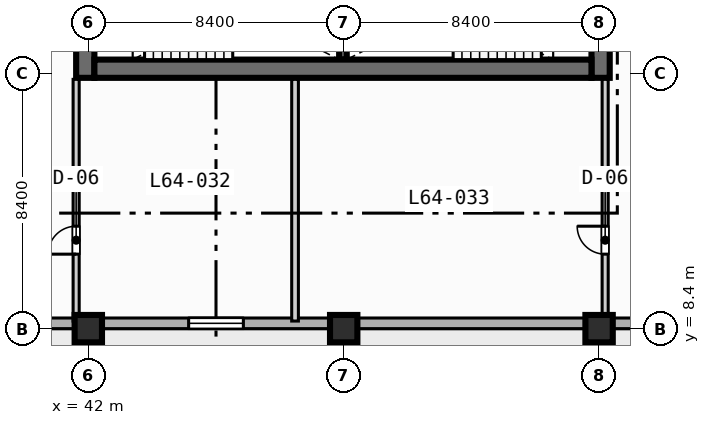
"""IFC4 building model, lengths in metres.
Left out: names, types, materials, properties, quantities, classifications, styles, units other than length and angle.
Written with IfcOpenShell. Run it as: python <this file> out.ifc"""

import sys

from ifc_helpers import new_model, si_unit, direction, frame, frame_2d, origin, origin_2d, place, context, subcontext, project, spatial, rectangle, extrude, element, fill, save


model = new_model("IFC4")
c1 = context("Model", 3, precision=1e-05, world=origin(), true_north=direction((0.0, 1.0)))
c2 = subcontext(c1, "Body", "Model", "MODEL_VIEW")
j1 = project(units=[si_unit("LENGTHUNIT", "METRE"), si_unit("PLANEANGLEUNIT", "RADIAN")], contexts=[c1])
p1 = place(None, origin())
s1 = spatial("IfcSite", under=j1, at=p1, CompositionType="ELEMENT")
p2 = place(p1, origin())
s2 = spatial("IfcBuilding", under=s1, at=p2, CompositionType="ELEMENT")
p3 = place(p2, frame((0.0, 0.0, 260.1)))
s3 = spatial("IfcBuildingStorey", under=s2, at=p3, CompositionType="ELEMENT", Elevation=260.1)
p4 = place(p3, frame((50.375, 17.25, 0.0), z_axis=(0.0, 0.0, 1.0), x_axis=(0.0, 1.0, 0.0)))
e1 = element("IfcWall", 1, at=p4, inside=s3, PredefinedType="SOLIDWALL", context=c2, shape_type="SweptSolid", body=[
    extrude(rectangle(XDim=3.5, YDim=0.25, at=frame_2d((1.75, 0.0))), origin(), (0.0, 0.0, 1.0), 3.47),
])
for number, where, z_axis, x_axis in (
    (2, (41.9, 16.65, 0.0), (0.0, 0.0, 1.0), (0.0, 1.0, 0.0)),
    (3, (58.85, 16.65, 0.0), (0.0, 0.0, 1.0), (0.0, 1.0, 0.0)),
):
    element("IfcWall", number, at=place(p3, frame(where, z_axis=z_axis, x_axis=x_axis)), inside=s3, PredefinedType="SHEAR", context=c2, shape_type="SweptSolid", body=[
        extrude(rectangle(XDim=1.35, YDim=0.6, at=frame_2d((0.675, 0.0))), origin(), (0.0, 0.0, 1.0), 3.47),
    ])
p5 = place(p3, frame((42.2, 16.95, 0.0), z_axis=(0.0, 0.0, 1.0), x_axis=(1.0, 0.0, 0.0)))
e4 = element("IfcWall", 4, at=p5, inside=s3, PredefinedType="SHEAR", context=c2, shape_type="SweptSolid", body=[
    extrude(rectangle(XDim=16.35, YDim=0.6, at=frame_2d((8.175, 0.0))), origin(), (0.0, 0.0, 1.0), 3.47),
])
for number, where, z_axis, x_axis in (
    (5, (42.0, 8.4, 0.0), (0.0, 0.0, 1.0), (1.0, 0.0, 0.0)),
    (6, (50.4, 8.4, 0.0), (0.0, 0.0, 1.0), (1.0, 0.0, 0.0)),
    (7, (58.8, 8.4, 0.0), (0.0, 0.0, 1.0), (1.0, 0.0, 0.0)),
):
    element("IfcColumn", number, at=place(p3, frame(where, z_axis=z_axis, x_axis=x_axis)), inside=s3, PredefinedType="COLUMN", context=c2, shape_type="SweptSolid", body=[
        extrude(rectangle(XDim=0.9, YDim=0.9, at=origin_2d()), origin(), (0.0, 0.0, 1.0), 3.7),
    ])
p6 = place(p3, frame((72.425, 8.575, 0.0), z_axis=(0.0, 0.0, 1.0), x_axis=(-1.0, 0.0, 0.0)))
e8 = element("IfcWall", 8, at=p6, inside=s3, PredefinedType="STANDARD", context=c2, shape_type="SweptSolid", body=[
    extrude(rectangle(XDim=60.85, YDim=0.35, at=frame_2d((30.425, 0.0))), origin(), (0.0, 0.0, 1.0), 3.47),
])
p7 = place(p6, frame((41.325, 0.0, 0.0)))
e9 = element("IfcOpeningElement", 9, at=p7, cuts=e8, PredefinedType="OPENING", context=c2, shape_type="SweptSolid", body=[
    extrude(rectangle(XDim=1.4, YDim=2.2, at=frame_2d((0.7, 1.1))), frame((0.0, 0.185, 0.0), z_axis=(0.0, -1.0, 0.0), x_axis=(1.0, 0.0, 0.0)), (0.0, 0.0, 1.0), 0.37),
])
p8 = place(p6, frame((50.225, 0.0, 0.85)))
e10 = element("IfcOpeningElement", 10, at=p8, cuts=e8, PredefinedType="OPENING", context=c2, shape_type="SweptSolid", body=[
    extrude(rectangle(XDim=2.4, YDim=1.95, at=frame_2d((1.2, 0.975))), frame((0.0, 0.185, 0.0), z_axis=(0.0, -1.0, 0.0), x_axis=(1.0, 0.0, 0.0)), (0.0, 0.0, 1.0), 0.37),
])
p9 = place(p6, frame((33.425, 0.0, 0.85)))
e11 = element("IfcOpeningElement", 11, at=p9, cuts=e8, PredefinedType="OPENING", context=c2, shape_type="SweptSolid", body=[
    extrude(rectangle(XDim=2.4, YDim=1.95, at=frame_2d((1.2, 0.975))), frame((0.0, 0.185, 0.0), z_axis=(0.0, -1.0, 0.0), x_axis=(1.0, 0.0, 0.0)), (0.0, 0.0, 1.0), 0.37),
])
p10 = place(p6, frame((25.325, 0.0, 0.85)))
e12 = element("IfcOpeningElement", 12, at=p10, cuts=e8, PredefinedType="OPENING", context=c2, shape_type="SweptSolid", body=[
    extrude(rectangle(XDim=1.8, YDim=1.8, at=frame_2d((0.9, 0.9))), frame((0.0, 0.185, 0.0), z_axis=(0.0, -1.0, 0.0), x_axis=(1.0, 0.0, 0.0)), (0.0, 0.0, 1.0), 0.37),
])
p11 = place(p6, frame((58.15, 0.0, 0.85)))
e13 = element("IfcOpeningElement", 13, at=p11, cuts=e8, PredefinedType="OPENING", context=c2, shape_type="SweptSolid", body=[
    extrude(rectangle(XDim=1.8, YDim=1.8, at=frame_2d((0.9, 0.9))), frame((0.0, 0.185, 0.0), z_axis=(0.0, -1.0, 0.0), x_axis=(1.0, 0.0, 0.0)), (0.0, 0.0, 1.0), 0.37),
])
p12 = place(p6, frame((56.29, 0.0, 0.85)))
e14 = element("IfcOpeningElement", 14, at=p12, cuts=e8, PredefinedType="OPENING", context=c2, shape_type="SweptSolid", body=[
    extrude(rectangle(XDim=0.72, YDim=1.8, at=frame_2d((0.36, 0.9))), frame((0.0, 0.185, 0.0), z_axis=(0.0, -1.0, 0.0), x_axis=(1.0, 0.0, 0.0)), (0.0, 0.0, 1.0), 0.37),
])
p13 = place(p6, frame((44.15, 0.0, 0.85)))
e15 = element("IfcOpeningElement", 15, at=p13, cuts=e8, PredefinedType="OPENING", context=c2, shape_type="SweptSolid", body=[
    extrude(rectangle(XDim=1.8, YDim=1.8, at=frame_2d((0.9, 0.9))), frame((0.0, 0.185, 0.0), z_axis=(0.0, -1.0, 0.0), x_axis=(1.0, 0.0, 0.0)), (0.0, 0.0, 1.0), 0.37),
])
p14 = place(p3, frame((41.6, 8.65, 0.0), z_axis=(0.0, 0.0, 1.0), x_axis=(0.0, 1.0, 0.0)))
e16 = element("IfcWall", 16, at=p14, inside=s3, PredefinedType="PARTITIONING", context=c2, shape_type="SweptSolid", body=[
    extrude(rectangle(XDim=7.95, YDim=0.2, at=frame_2d((3.975, 0.0))), origin(), (0.0, 0.0, 1.0), 3.47),
])
p15 = place(p14, frame((2.2, 0.0, 0.0)))
e17 = element("IfcOpeningElement", 17, at=p15, cuts=e16, PredefinedType="OPENING", context=c2, shape_type="SweptSolid", body=[
    extrude(rectangle(XDim=0.92, YDim=2.1, at=frame_2d((0.46, 1.05))), frame((0.0, 0.11, 0.0), z_axis=(0.0, -1.0, 0.0), x_axis=(1.0, 0.0, 0.0)), (0.0, 0.0, 1.0), 0.22),
])
p16 = place(p3, frame((59.0, 8.65, 0.0), z_axis=(0.0, 0.0, 1.0), x_axis=(0.0, 1.0, 0.0)))
e18 = element("IfcWall", 18, at=p16, inside=s3, PredefinedType="PARTITIONING", context=c2, shape_type="SweptSolid", body=[
    extrude(rectangle(XDim=7.95, YDim=0.2, at=frame_2d((3.975, 0.0))), origin(), (0.0, 0.0, 1.0), 2.931),
])
p17 = place(p16, frame((2.2, 0.0, 0.0)))
e19 = element("IfcOpeningElement", 19, at=p17, cuts=e18, PredefinedType="OPENING", context=c2, shape_type="SweptSolid", body=[
    extrude(rectangle(XDim=0.92, YDim=2.1, at=frame_2d((0.46, 1.05))), frame((0.0, 0.11, 0.0), z_axis=(0.0, -1.0, 0.0), x_axis=(1.0, 0.0, 0.0)), (0.0, 0.0, 1.0), 0.22),
])
p18 = place(p3, frame((48.8, 8.65, 0.0), z_axis=(0.0, 0.0, 1.0), x_axis=(0.0, 1.0, 0.0)))
e20 = element("IfcWall", 20, at=p18, inside=s3, PredefinedType="PARTITIONING", context=c2, shape_type="SweptSolid", body=[
    extrude(rectangle(XDim=7.95, YDim=0.22, at=frame_2d((3.975, 0.0))), origin(), (0.0, 0.0, 1.0), 3.47),
])
p19 = place(p10, origin())
e21 = element("IfcWindow", 21, at=p19, inside=s3, PartitioningType="SINGLE_PANEL", PredefinedType="WINDOW", context=c2, shape_type="SweptSolid", body=[
    extrude(rectangle(XDim=1.8, YDim=1.8, at=frame_2d((0.9, 0.9))), frame((0.0, 0.03, 0.0), z_axis=(0.0, -1.0, 0.0), x_axis=(1.0, 0.0, 0.0)), (0.0, 0.0, 1.0), 0.06),
])
fill(e12, e21)
p20 = place(p15, origin())
e22 = element("IfcDoor", 22, at=p20, inside=s3, OperationType="SINGLE_SWING_LEFT", PredefinedType="DOOR", context=c2, shape_type="SweptSolid", body=[
    extrude(rectangle(XDim=0.92, YDim=2.1, at=frame_2d((0.46, 1.05))), frame((0.0, 0.025, 0.0), z_axis=(0.0, -1.0, 0.0), x_axis=(1.0, 0.0, 0.0)), (0.0, 0.0, 1.0), 0.05),
])
fill(e17, e22)
p21 = place(p17, origin())
e23 = element("IfcDoor", 23, at=p21, inside=s3, OperationType="SINGLE_SWING_RIGHT", PredefinedType="DOOR", context=c2, shape_type="SweptSolid", body=[
    extrude(rectangle(XDim=0.92, YDim=2.1, at=frame_2d((0.46, 1.05))), frame((0.0, 0.025, 0.0), z_axis=(0.0, -1.0, 0.0), x_axis=(1.0, 0.0, 0.0)), (0.0, 0.0, 1.0), 0.05),
])
fill(e19, e23)
save(model, sys.argv[1])
